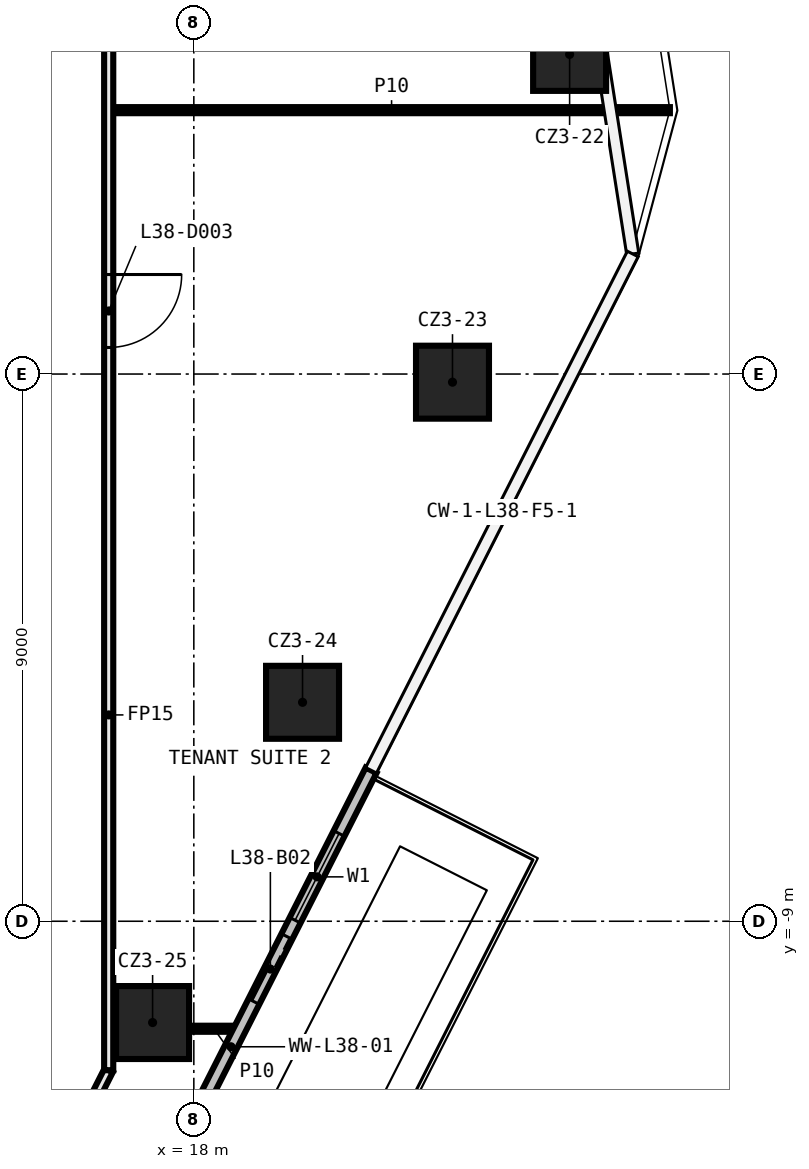
"""IFC4 building model, lengths in metres.
Left out: names, types, materials, properties, quantities, classifications, styles, units other than length and angle.
Written with IfcOpenShell. Run it as: python <this file> out.ifc"""

import sys

from ifc_helpers import new_model, si_unit, direction, frame, frame_2d, origin, origin_2d, place, context, subcontext, project, spatial, rectangle, extrude, element, fill, save


model = new_model("IFC4")
c1 = context("Model", 3, precision=1e-05, world=origin(), true_north=direction((0.0, 1.0)))
c2 = subcontext(c1, "Body", "Model", "MODEL_VIEW")
j1 = project(units=[si_unit("LENGTHUNIT", "METRE"), si_unit("PLANEANGLEUNIT", "RADIAN")], contexts=[c1])
p1 = place(None, origin())
s1 = spatial("IfcSite", under=j1, at=p1, CompositionType="ELEMENT")
p2 = place(p1, origin())
s2 = spatial("IfcBuilding", under=s1, at=p2, CompositionType="ELEMENT")
p3 = place(p2, frame((0.0, 0.0, 175.4)))
s3 = spatial("IfcBuildingStorey", under=s2, at=p3, CompositionType="ELEMENT", Elevation=175.4)
for number, where, z_axis, x_axis in (
    (1, (24.18, 5.257, 0.0), (0.0, 0.0, 1.0), (1.0, 0.0, 0.0)),
    (2, (22.254, -0.134, 0.0), (0.0, 0.0, 1.0), (1.0, 0.0, 0.0)),
    (3, (19.788, -5.399, 0.0), (0.0, 0.0, 1.0), (1.0, 0.0, 0.0)),
    (4, (17.322, -10.666, 0.0), (0.0, 0.0, 1.0), (1.0, 0.0, 0.0)),
):
    element("IfcColumn", number, at=place(p3, frame(where, z_axis=z_axis, x_axis=x_axis)), inside=s3, PredefinedType="COLUMN", context=c2, shape_type="SweptSolid", body=[
        extrude(rectangle(XDim=1.2, YDim=1.2, at=origin_2d()), origin(), (0.0, 0.0, 1.0), 3.82),
    ])
p4 = place(p3, frame((17.922, -10.768, 0.0), z_axis=(0.0, 0.0, 1.0), x_axis=(1.0, 0.0, 0.0)))
e5 = element("IfcWall", 5, at=p4, inside=s3, PredefinedType="PARTITIONING", context=c2, shape_type="SweptSolid", body=[
    extrude(rectangle(XDim=0.817, YDim=0.1, at=frame_2d((0.409, 0.0))), origin(), (0.0, 0.0, 1.0), 3.82),
])
p5 = place(p3, frame((16.675, 4.34, 0.0), z_axis=(0.0, 0.0, 1.0), x_axis=(1.0, 0.0, 0.0)))
e6 = element("IfcWall", 6, at=p5, inside=s3, PredefinedType="PARTITIONING", context=c2, shape_type="SweptSolid", body=[
    extrude(rectangle(XDim=9.154, YDim=0.1, at=frame_2d((4.577, 0.0))), origin(), (0.0, 0.0, 1.0), 3.82),
])
p6 = place(p3, frame((15.511, -13.6, 0.0), z_axis=(0.0, 0.0, 1.0), x_axis=(0.45198735735, 0.892024343163, 0.0)))
e7 = element("IfcWall", 7, at=p6, inside=s3, PredefinedType="PARTITIONING", context=c2, shape_type="SweptSolid", body=[
    extrude(rectangle(XDim=2.411, YDim=0.15, at=frame_2d((1.205, 0.0))), origin(), (0.0, 0.0, 1.0), 3.82),
])
p7 = place(p3, frame((16.6, 13.525, 0.0), z_axis=(0.0, 0.0, 1.0), x_axis=(0.0, -1.0, 0.0)))
e8 = element("IfcWall", 8, at=p7, inside=s3, PredefinedType="PARTITIONING", context=c2, shape_type="SweptSolid", body=[
    extrude(rectangle(XDim=24.975, YDim=0.15, at=frame_2d((12.487, 0.0))), origin(), (0.0, 0.0, 1.0), 3.82),
])
p8 = place(p7, frame((11.888, 0.0, 0.0)))
e9 = element("IfcOpeningElement", 9, at=p8, cuts=e8, PredefinedType="OPENING", context=c2, shape_type="SweptSolid", body=[
    extrude(rectangle(XDim=1.2, YDim=2.1, at=frame_2d((0.6, 1.05))), frame((0.0, 0.085, 0.0), z_axis=(0.0, -1.0, 0.0), x_axis=(1.0, 0.0, 0.0)), (0.0, 0.0, 1.0), 0.17),
])
p9 = place(p7, frame((4.808, 0.0, 0.0)))
e10 = element("IfcOpeningElement", 10, at=p9, cuts=e8, PredefinedType="OPENING", context=c2, shape_type="SweptSolid", body=[
    extrude(rectangle(XDim=1.2, YDim=2.1, at=frame_2d((0.6, 1.05))), frame((0.0, 0.085, 0.0), z_axis=(0.0, -1.0, 0.0), x_axis=(1.0, 0.0, 0.0)), (0.0, 0.0, 1.0), 0.17),
])
p10 = place(p3, frame((16.608, -15.018, 0.0), z_axis=(0.0, 0.0, 1.0), x_axis=(0.452002844598, 0.89201649563, 0.0)))
e11 = element("IfcWall", 11, at=p10, inside=s3, PredefinedType="SOLIDWALL", context=c2, shape_type="SweptSolid", body=[
    extrude(rectangle(XDim=9.53, YDim=0.2, at=frame_2d((4.765, 0.0))), origin(), (0.0, 0.0, 1.0), 3.7),
])
p11 = place(p10, frame((2.0, 0.0, 0.6)))
e12 = element("IfcOpeningElement", 12, at=p11, cuts=e11, PredefinedType="OPENING", context=c2, shape_type="SweptSolid", body=[
    extrude(rectangle(XDim=1.6, YDim=2.4, at=frame_2d((0.8, 1.2))), frame((0.0, 0.11, 0.0), z_axis=(0.0, -1.0, 0.0), x_axis=(1.0, 0.0, 0.0)), (0.0, 0.0, 1.0), 0.22),
])
p12 = place(p10, frame((0.5, 0.0, 0.0)))
e13 = element("IfcOpeningElement", 13, at=p12, cuts=e11, PredefinedType="OPENING", context=c2, shape_type="SweptSolid", body=[
    extrude(rectangle(XDim=1.2, YDim=2.4, at=frame_2d((0.6, 1.2))), frame((0.0, 0.11, 0.0), z_axis=(0.0, -1.0, 0.0), x_axis=(1.0, 0.0, 0.0)), (0.0, 0.0, 1.0), 0.22),
])
p13 = place(p10, frame((6.765, 0.0, 0.6)))
e14 = element("IfcOpeningElement", 14, at=p13, cuts=e11, PredefinedType="OPENING", context=c2, shape_type="SweptSolid", body=[
    extrude(rectangle(XDim=1.6, YDim=2.4, at=frame_2d((0.8, 1.2))), frame((0.0, 0.11, 0.0), z_axis=(0.0, -1.0, 0.0), x_axis=(1.0, 0.0, 0.0)), (0.0, 0.0, 1.0), 0.22),
])
p14 = place(p10, frame((5.265, 0.0, 0.0)))
e15 = element("IfcOpeningElement", 15, at=p14, cuts=e11, PredefinedType="OPENING", context=c2, shape_type="SweptSolid", body=[
    extrude(rectangle(XDim=1.2, YDim=2.4, at=frame_2d((0.6, 1.2))), frame((0.0, 0.11, 0.0), z_axis=(0.0, -1.0, 0.0), x_axis=(1.0, 0.0, 0.0)), (0.0, 0.0, 1.0), 0.22),
])
p15 = place(p8, origin())
e16 = element("IfcDoor", 16, at=p15, inside=s3, OperationType="SINGLE_SWING_RIGHT", PredefinedType="DOOR", context=c2, shape_type="SweptSolid", body=[
    extrude(rectangle(XDim=1.2, YDim=2.1, at=frame_2d((0.6, 1.05))), frame((0.0, 0.025, 0.0), z_axis=(0.0, -1.0, 0.0), x_axis=(1.0, 0.0, 0.0)), (0.0, 0.0, 1.0), 0.05),
])
fill(e9, e16)
p16 = place(p13, origin())
e17 = element("IfcWindow", 17, at=p16, inside=s3, PartitioningType="SINGLE_PANEL", PredefinedType="WINDOW", context=c2, shape_type="SweptSolid", body=[
    extrude(rectangle(XDim=1.6, YDim=2.4, at=frame_2d((0.8, 1.2))), frame((0.0, 0.03, 0.0), z_axis=(0.0, -1.0, 0.0), x_axis=(1.0, 0.0, 0.0)), (0.0, 0.0, 1.0), 0.06),
])
fill(e14, e17)
p17 = place(p14, origin())
e18 = element("IfcDoor", 18, at=p17, inside=s3, OperationType="SLIDING_TO_LEFT", PredefinedType="DOOR", context=c2, shape_type="SweptSolid", body=[
    extrude(rectangle(XDim=1.2, YDim=2.4, at=frame_2d((0.6, 1.2))), frame((0.0, 0.025, 0.0), z_axis=(0.0, -1.0, 0.0), x_axis=(1.0, 0.0, 0.0)), (0.0, 0.0, 1.0), 0.05),
])
fill(e15, e18)
save(model, sys.argv[1])
